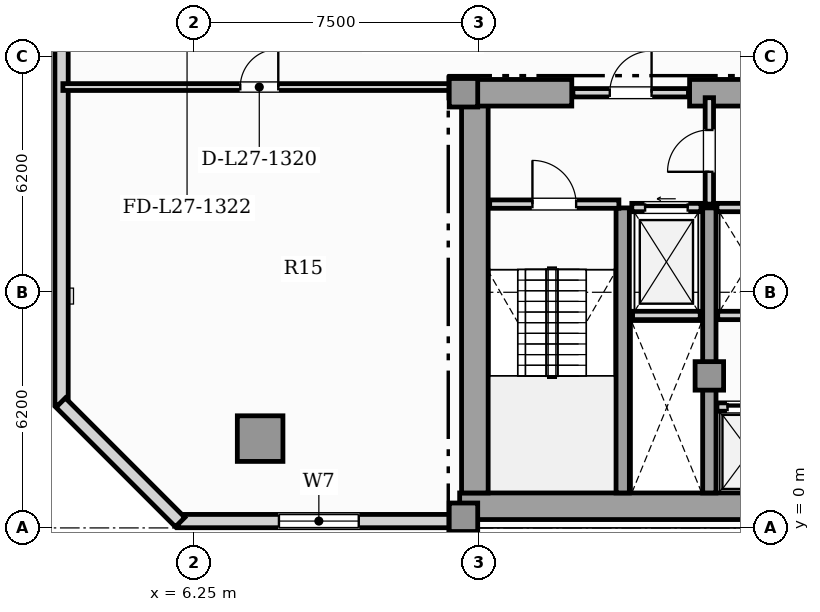
"""IFC4 building model, lengths in metres.
Left out: names, types, materials, properties, quantities, classifications, styles, units other than length and angle.
Written with IfcOpenShell. Run it as: python <this file> out.ifc"""

import sys

from ifc_helpers import new_model, si_unit, direction, frame, frame_2d, origin, origin_2d, place, context, subcontext, project, spatial, rectangle, hollow_rectangle, extrude, element, fill, save


model = new_model("IFC4")
c1 = context("Model", 3, precision=1e-05, world=origin(), true_north=direction((0.0, 1.0)))
c2 = subcontext(c1, "Body", "Model", "MODEL_VIEW")
j1 = project(units=[si_unit("LENGTHUNIT", "METRE"), si_unit("PLANEANGLEUNIT", "RADIAN")], contexts=[c1])
p1 = place(None, origin())
s1 = spatial("IfcSite", under=j1, at=p1, CompositionType="ELEMENT")
p2 = place(p1, origin())
s2 = spatial("IfcBuilding", under=s1, at=p2, CompositionType="ELEMENT")
p3 = place(p2, frame((0.0, 0.0, 111.85)))
s3 = spatial("IfcBuildingStorey", under=s2, at=p3, CompositionType="ELEMENT", Elevation=111.85)
p4 = place(p3, frame((13.25, 0.57, 0.0), z_axis=(0.0, 0.0, 1.0), x_axis=(1.0, 0.0, 0.0)))
e1 = element("IfcWall", 1, at=p4, inside=s3, PredefinedType="SHEAR", context=c2, shape_type="SweptSolid", body=[
    extrude(rectangle(XDim=31.0, YDim=0.7, at=frame_2d((15.5, 0.0))), origin(), (0.0, 0.0, 1.0), 3.6),
])
p5 = place(p3, frame((13.65, 0.92, 0.0), z_axis=(0.0, 0.0, 1.0), x_axis=(0.0, 1.0, 0.0)))
e2 = element("IfcWall", 2, at=p5, inside=s3, PredefinedType="SHEAR", context=c2, shape_type="SweptSolid", body=[
    extrude(rectangle(XDim=10.53, YDim=0.7, at=frame_2d((5.265, 0.0))), origin(), (0.0, 0.0, 1.0), 3.6),
])
p6 = place(p3, frame((13.25, 11.45, 0.0), z_axis=(0.0, 0.0, 1.0), x_axis=(1.0, 0.0, 0.0)))
e3 = element("IfcWall", 3, at=p6, inside=s3, PredefinedType="SHEAR", context=c2, shape_type="SweptSolid", body=[
    extrude(rectangle(XDim=2.95, YDim=0.7, at=frame_2d((1.475, 0.0))), origin(), (0.0, 0.0, 1.0), 3.6),
])
p7 = place(p3, frame((19.3, 11.45, 0.0), z_axis=(0.0, 0.0, 1.0), x_axis=(1.0, 0.0, 0.0)))
e4 = element("IfcWall", 4, at=p7, inside=s3, PredefinedType="SHEAR", context=c2, shape_type="SweptSolid", body=[
    extrude(rectangle(XDim=7.3, YDim=0.7, at=frame_2d((3.65, 0.0))), origin(), (0.0, 0.0, 1.0), 3.6),
])
for number, where, z_axis, x_axis in (
    (5, (17.54, 0.92, 0.0), (0.0, 0.0, 1.0), (0.0, 1.0, 0.0)),
    (6, (19.82, 0.92, 0.0), (0.0, 0.0, 1.0), (0.0, 1.0, 0.0)),
):
    element("IfcWall", number, at=place(p3, frame(where, z_axis=z_axis, x_axis=x_axis)), inside=s3, PredefinedType="SHEAR", context=c2, shape_type="SweptSolid", body=[
        extrude(rectangle(XDim=7.5, YDim=0.35, at=frame_2d((3.75, 0.0))), origin(), (0.0, 0.0, 1.0), 3.6),
    ])
for number, where, z_axis, x_axis in (
    (7, (13.35, 0.28, 0.0), (0.0, 0.0, 1.0), (1.0, 0.0, 0.0)),
    (8, (13.35, 11.45, 0.0), (0.0, 0.0, 1.0), (1.0, 0.0, 0.0)),
    (9, (19.82, 4.0, 0.0), (0.0, 0.0, 1.0), (1.0, 0.0, 0.0)),
):
    element("IfcColumn", number, at=place(p3, frame(where, z_axis=z_axis, x_axis=x_axis)), inside=s3, PredefinedType="COLUMN", context=c2, shape_type="SweptSolid", body=[
        extrude(rectangle(XDim=0.75, YDim=0.75, at=origin_2d()), origin(), (0.0, 0.0, 1.0), 3.85),
    ])
p8 = place(p3, frame((8.0, 2.35, 0.0), z_axis=(0.0, 0.0, 1.0), x_axis=(1.0, 0.0, 0.0)))
e10 = element("IfcColumn", 10, at=p8, inside=s3, PredefinedType="USERDEFINED", context=c2, shape_type="SweptSolid", body=[
    extrude(hollow_rectangle(XDim=1.2, YDim=1.2, WallThickness=0.07, at=origin_2d()), origin(), (0.0, 0.0, 1.0), 3.85),
])
p9 = place(p3, frame((5.84, 0.18, 0.0), z_axis=(0.0, 0.0, 1.0), x_axis=(1.0, 0.0, 0.0)))
e11 = element("IfcWall", 11, at=p9, inside=s3, PredefinedType="SOLIDWALL", context=c2, shape_type="SweptSolid", body=[
    extrude(rectangle(XDim=7.41, YDim=0.35, at=frame_2d((3.705, 0.0))), origin(), (0.0, 0.0, 1.0), 3.6),
])
p10 = place(p9, frame((2.655, 0.0, 0.85)))
e12 = element("IfcOpeningElement", 12, at=p10, cuts=e11, PredefinedType="OPENING", context=c2, shape_type="SweptSolid", body=[
    extrude(rectangle(XDim=2.1, YDim=2.05, at=frame_2d((1.05, 1.025))), frame((0.0, 0.185, 0.0), z_axis=(0.0, -1.0, 0.0), x_axis=(1.0, 0.0, 0.0)), (0.0, 0.0, 1.0), 0.37),
])
p11 = place(p3, frame((2.775, 22.31, 0.0), z_axis=(0.0, 0.0, 1.0), x_axis=(0.0, -1.0, 0.0)))
e13 = element("IfcWall", 13, at=p11, inside=s3, PredefinedType="SOLIDWALL", context=c2, shape_type="SweptSolid", body=[
    extrude(rectangle(XDim=19.07, YDim=0.35, at=frame_2d((9.535, 0.0))), origin(), (0.0, 0.0, 1.0), 3.6),
])
p12 = place(p3, frame((2.752, 3.295, 0.0), z_axis=(0.0, 0.0, 1.0), x_axis=(0.707134240044, -0.707079321262, 0.0)))
e14 = element("IfcWall", 14, at=p12, inside=s3, PredefinedType="SOLIDWALL", context=c2, shape_type="SweptSolid", body=[
    extrude(rectangle(XDim=4.446, YDim=0.35, at=frame_2d((2.223, 0.0))), origin(), (0.0, 0.0, 1.0), 3.6),
])
p13 = place(p3, frame((17.8, 5.59, 0.0), z_axis=(0.0, 0.0, 1.0), x_axis=(1.0, 0.0, 0.0)))
e15 = element("IfcWall", 15, at=p13, inside=s3, PredefinedType="SOLIDWALL", context=c2, shape_type="SweptSolid", body=[
    extrude(rectangle(XDim=1.78, YDim=0.22, at=frame_2d((0.89, 0.0))), origin(), (0.0, 0.0, 1.0), 3.6),
])
p14 = place(p3, frame((17.78, 8.43, 0.0), z_axis=(0.0, 0.0, 1.0), x_axis=(1.0, 0.0, 0.0)))
e16 = element("IfcWall", 16, at=p14, inside=s3, PredefinedType="SOLIDWALL", context=c2, shape_type="SweptSolid", body=[
    extrude(rectangle(XDim=1.82, YDim=0.22, at=frame_2d((0.91, 0.0))), origin(), (0.0, 0.0, 1.0), 3.6),
])
p15 = place(p14, frame((0.35, 0.0, 0.0)))
e17 = element("IfcOpeningElement", 17, at=p15, cuts=e16, PredefinedType="OPENING", context=c2, shape_type="SweptSolid", body=[
    extrude(rectangle(XDim=1.12, YDim=2.25, at=frame_2d((0.56, 1.125))), frame((0.0, 0.12, 0.0), z_axis=(0.0, -1.0, 0.0), x_axis=(1.0, 0.0, 0.0)), (0.0, 0.0, 1.0), 0.24),
])
p16 = place(p3, frame((20.02, 3.18, 0.0), z_axis=(0.0, 0.0, 1.0), x_axis=(1.0, 0.0, 0.0)))
e18 = element("IfcWall", 18, at=p16, inside=s3, PredefinedType="SOLIDWALL", context=c2, shape_type="SweptSolid", body=[
    extrude(rectangle(XDim=1.74, YDim=0.22, at=frame_2d((0.87, 0.0))), origin(), (0.0, 0.0, 1.0), 3.6),
])
p17 = place(p16, frame((0.28, 0.0, 0.0)))
e19 = element("IfcOpeningElement", 19, at=p17, cuts=e18, PredefinedType="OPENING", context=c2, shape_type="SweptSolid", body=[
    extrude(rectangle(XDim=1.18, YDim=2.2, at=frame_2d((0.59, 1.1))), frame((0.0, 0.12, 0.0), z_axis=(0.0, -1.0, 0.0), x_axis=(1.0, 0.0, 0.0)), (0.0, 0.0, 1.0), 0.24),
])
p18 = place(p3, frame((20.04, 5.59, 0.0), z_axis=(0.0, 0.0, 1.0), x_axis=(1.0, 0.0, 0.0)))
e20 = element("IfcWall", 20, at=p18, inside=s3, PredefinedType="SOLIDWALL", context=c2, shape_type="SweptSolid", body=[
    extrude(rectangle(XDim=1.7, YDim=0.22, at=frame_2d((0.85, 0.0))), origin(), (0.0, 0.0, 1.0), 3.6),
])
p19 = place(p3, frame((20.02, 8.43, 0.0), z_axis=(0.0, 0.0, 1.0), x_axis=(1.0, 0.0, 0.0)))
e21 = element("IfcWall", 21, at=p19, inside=s3, PredefinedType="SOLIDWALL", context=c2, shape_type="SweptSolid", body=[
    extrude(rectangle(XDim=1.74, YDim=0.22, at=frame_2d((0.87, 0.0))), origin(), (0.0, 0.0, 1.0), 3.6),
])
p20 = place(p3, frame((14.04, 8.52, 0.0), z_axis=(0.0, 0.0, 1.0), x_axis=(1.0, 0.0, 0.0)))
e22 = element("IfcWall", 22, at=p20, inside=s3, PredefinedType="SOLIDWALL", context=c2, shape_type="SweptSolid", body=[
    extrude(rectangle(XDim=3.4, YDim=0.22, at=frame_2d((1.7, 0.0))), origin(), (0.0, 0.0, 1.0), 3.6),
])
p21 = place(p20, frame((1.125, 0.0, 0.0)))
e23 = element("IfcOpeningElement", 23, at=p21, cuts=e22, PredefinedType="OPENING", context=c2, shape_type="SweptSolid", body=[
    extrude(rectangle(XDim=1.15, YDim=2.2, at=frame_2d((0.575, 1.1))), frame((0.0, 0.12, 0.0), z_axis=(0.0, -1.0, 0.0), x_axis=(1.0, 0.0, 0.0)), (0.0, 0.0, 1.0), 0.24),
])
p22 = place(p3, frame((19.82, 8.52, 0.0), z_axis=(0.0, 0.0, 1.0), x_axis=(0.0, 1.0, 0.0)))
e24 = element("IfcWall", 24, at=p22, inside=s3, PredefinedType="SOLIDWALL", context=c2, shape_type="SweptSolid", body=[
    extrude(rectangle(XDim=2.8, YDim=0.22, at=frame_2d((1.4, 0.0))), origin(), (0.0, 0.0, 1.0), 3.055),
])
p23 = place(p22, frame((0.85, 0.0, 0.0)))
e25 = element("IfcOpeningElement", 25, at=p23, cuts=e24, PredefinedType="OPENING", context=c2, shape_type="SweptSolid", body=[
    extrude(rectangle(XDim=1.1, YDim=2.2, at=frame_2d((0.55, 1.1))), frame((0.0, 0.12, 0.0), z_axis=(0.0, -1.0, 0.0), x_axis=(1.0, 0.0, 0.0)), (0.0, 0.0, 1.0), 0.24),
])
p24 = place(p3, frame((16.23, 11.45, 0.0), z_axis=(0.0, 0.0, 1.0), x_axis=(1.0, 0.0, 0.0)))
e26 = element("IfcWall", 26, at=p24, inside=s3, PredefinedType="SOLIDWALL", context=c2, shape_type="SweptSolid", body=[
    extrude(rectangle(XDim=3.04, YDim=0.22, at=frame_2d((1.52, 0.0))), origin(), (0.0, 0.0, 1.0), 3.6),
])
p25 = place(p24, frame((0.97, 0.0, 0.0)))
e27 = element("IfcOpeningElement", 27, at=p25, cuts=e26, PredefinedType="OPENING", context=c2, shape_type="SweptSolid", body=[
    extrude(rectangle(XDim=1.1, YDim=2.2, at=frame_2d((0.55, 1.1))), frame((0.0, 0.12, 0.0), z_axis=(0.0, -1.0, 0.0), x_axis=(1.0, 0.0, 0.0)), (0.0, 0.0, 1.0), 0.24),
])
p26 = place(p3, frame((2.81, 11.6, 0.0), z_axis=(0.0, 0.0, 1.0), x_axis=(1.0, 0.0, 0.0)))
e28 = element("IfcWall", 28, at=p26, inside=s3, PredefinedType="PARTITIONING", context=c2, shape_type="SweptSolid", body=[
    extrude(rectangle(XDim=10.335, YDim=0.18, at=frame_2d((5.167, 0.0))), origin(), (0.0, 0.0, 1.0), 3.6),
])
p27 = place(p26, frame((4.667, 0.0, 0.0)))
e29 = element("IfcOpeningElement", 29, at=p27, cuts=e28, PredefinedType="OPENING", context=c2, shape_type="SweptSolid", body=[
    extrude(rectangle(XDim=1.0, YDim=2.15, at=frame_2d((0.5, 1.075))), frame((0.0, 0.1, 0.0), z_axis=(0.0, -1.0, 0.0), x_axis=(1.0, 0.0, 0.0)), (0.0, 0.0, 1.0), 0.2),
])
p28 = place(p10, origin())
e30 = element("IfcWindow", 30, at=p28, inside=s3, PartitioningType="SINGLE_PANEL", PredefinedType="WINDOW", context=c2, shape_type="SweptSolid", body=[
    extrude(rectangle(XDim=2.1, YDim=2.05, at=frame_2d((1.05, 1.025))), frame((0.0, 0.03, 0.0), z_axis=(0.0, -1.0, 0.0), x_axis=(1.0, 0.0, 0.0)), (0.0, 0.0, 1.0), 0.06),
])
fill(e12, e30)
p29 = place(p15, origin())
e31 = element("IfcDoor", 31, at=p29, inside=s3, OperationType="SLIDING_TO_LEFT", PredefinedType="DOOR", context=c2, shape_type="SweptSolid", body=[
    extrude(rectangle(XDim=1.12, YDim=2.25, at=frame_2d((0.56, 1.125))), frame((0.0, 0.025, 0.0), z_axis=(0.0, -1.0, 0.0), x_axis=(1.0, 0.0, 0.0)), (0.0, 0.0, 1.0), 0.05),
])
fill(e17, e31)
p30 = place(p17, origin())
e32 = element("IfcDoor", 32, at=p30, inside=s3, OperationType="SLIDING_TO_RIGHT", PredefinedType="DOOR", context=c2, shape_type="SweptSolid", body=[
    extrude(rectangle(XDim=1.18, YDim=2.2, at=frame_2d((0.59, 1.1))), frame((0.0, 0.025, 0.0), z_axis=(0.0, -1.0, 0.0), x_axis=(1.0, 0.0, 0.0)), (0.0, 0.0, 1.0), 0.05),
])
fill(e19, e32)
p31 = place(p21, origin())
e33 = element("IfcDoor", 33, at=p31, inside=s3, OperationType="SINGLE_SWING_LEFT", PredefinedType="DOOR", context=c2, shape_type="SweptSolid", body=[
    extrude(rectangle(XDim=1.15, YDim=2.2, at=frame_2d((0.575, 1.1))), frame((0.0, 0.025, 0.0), z_axis=(0.0, -1.0, 0.0), x_axis=(1.0, 0.0, 0.0)), (0.0, 0.0, 1.0), 0.05),
])
fill(e23, e33)
p32 = place(p23, origin())
e34 = element("IfcDoor", 34, at=p32, inside=s3, OperationType="SINGLE_SWING_LEFT", PredefinedType="DOOR", context=c2, shape_type="SweptSolid", body=[
    extrude(rectangle(XDim=1.1, YDim=2.2, at=frame_2d((0.55, 1.1))), frame((0.0, 0.025, 0.0), z_axis=(0.0, -1.0, 0.0), x_axis=(1.0, 0.0, 0.0)), (0.0, 0.0, 1.0), 0.05),
])
fill(e25, e34)
p33 = place(p25, origin())
e35 = element("IfcDoor", 35, at=p33, inside=s3, OperationType="SINGLE_SWING_RIGHT", PredefinedType="DOOR", context=c2, shape_type="SweptSolid", body=[
    extrude(rectangle(XDim=1.1, YDim=2.2, at=frame_2d((0.55, 1.1))), frame((0.0, 0.025, 0.0), z_axis=(0.0, -1.0, 0.0), x_axis=(1.0, 0.0, 0.0)), (0.0, 0.0, 1.0), 0.05),
])
fill(e27, e35)
p34 = place(p27, origin())
e36 = element("IfcDoor", 36, at=p34, inside=s3, OperationType="SINGLE_SWING_RIGHT", PredefinedType="DOOR", context=c2, shape_type="SweptSolid", body=[
    extrude(rectangle(XDim=1.0, YDim=2.15, at=frame_2d((0.5, 1.075))), frame((0.0, 0.025, 0.0), z_axis=(0.0, -1.0, 0.0), x_axis=(1.0, 0.0, 0.0)), (0.0, 0.0, 1.0), 0.05),
])
fill(e29, e36)
save(model, sys.argv[1])
